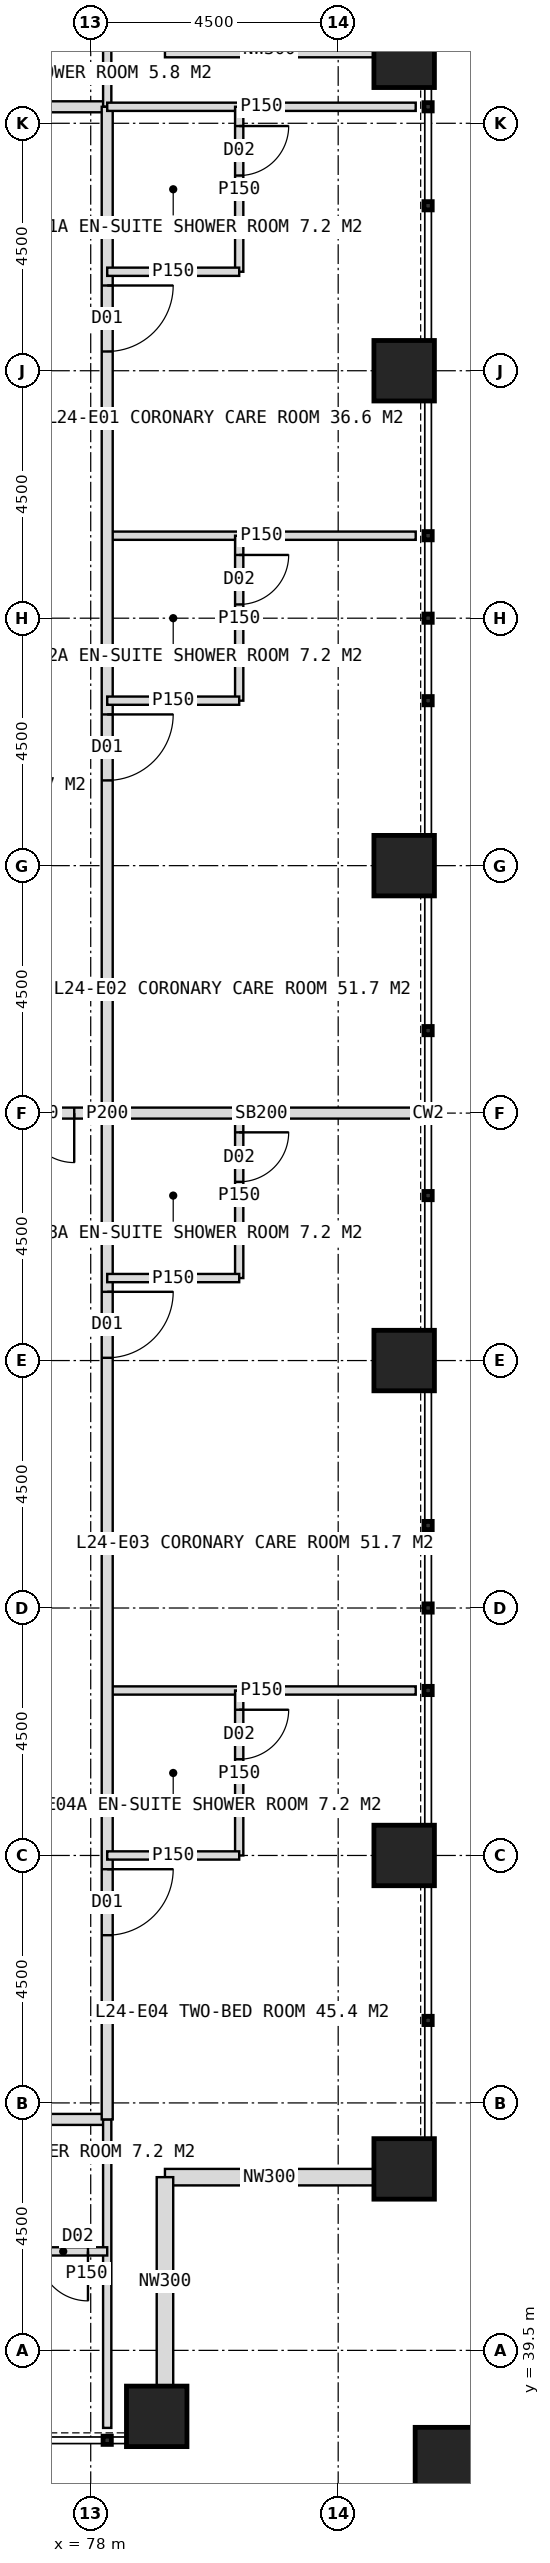
"""IFC4 building model, lengths in metres.
Left out: names, types, materials, properties, quantities, classifications, styles, units other than length and angle.
Written with IfcOpenShell. Run it as: python <this file> out.ifc"""

import sys

from ifc_helpers import new_model, si_unit, direction, frame, frame_2d, origin, origin_2d, place, context, subcontext, project, spatial, rectangle, hollow_rectangle, extrude, element, fill, save


model = new_model("IFC4")
c1 = context("Model", 3, precision=1e-05, world=origin(), true_north=direction((0.0, 1.0)))
c2 = subcontext(c1, "Body", "Model", "MODEL_VIEW")
j1 = project(units=[si_unit("LENGTHUNIT", "METRE"), si_unit("PLANEANGLEUNIT", "RADIAN")], contexts=[c1])
p1 = place(None, origin())
s1 = spatial("IfcSite", under=j1, at=p1, CompositionType="ELEMENT")
p2 = place(p1, origin())
s2 = spatial("IfcBuilding", under=s1, at=p2, CompositionType="ELEMENT")
p3 = place(p2, frame((0.0, 0.0, 104.0)))
s3 = spatial("IfcBuildingStorey", under=s2, at=p3, CompositionType="ELEMENT", Elevation=104.0)
for number, where, z_axis, x_axis in (
    (1, (83.7, 42.8, 0.0), (0.0, 0.0, 1.0), (1.0, 0.0, 0.0)),
    (2, (83.7, 48.5, 0.0), (0.0, 0.0, 1.0), (1.0, 0.0, 0.0)),
    (3, (83.7, 57.5, 0.0), (0.0, 0.0, 1.0), (1.0, 0.0, 0.0)),
    (4, (83.7, 66.5, 0.0), (0.0, 0.0, 1.0), (1.0, 0.0, 0.0)),
    (5, (83.7, 75.5, 0.0), (0.0, 0.0, 1.0), (1.0, 0.0, 0.0)),
    (6, (79.2, 38.3, 0.0), (0.0, 0.0, 1.0), (1.0, 0.0, 0.0)),
    (7, (83.7, 81.2, 0.0), (0.0, 0.0, 1.0), (1.0, 0.0, 0.0)),
):
    element("IfcColumn", number, at=place(p3, frame(where, z_axis=z_axis, x_axis=x_axis)), inside=s3, PredefinedType="COLUMN", context=c2, shape_type="SweptSolid", body=[
        extrude(hollow_rectangle(XDim=1.1, YDim=1.1, WallThickness=0.1, at=origin_2d()), origin(), (0.0, 0.0, 1.0), 4.0),
    ])
p4 = place(p3, frame((84.6, 37.4, 0.0), z_axis=(0.0, 0.0, 1.0), x_axis=(1.0, 0.0, 0.0)))
e8 = element("IfcColumn", 8, at=p4, inside=s3, PredefinedType="COLUMN", context=c2, shape_type="SweptSolid", body=[
    extrude(hollow_rectangle(XDim=1.4, YDim=1.4, WallThickness=0.08, at=origin_2d()), origin(), (0.0, 0.0, 1.0), 4.0),
])
for number, where, z_axis, x_axis in (
    (9, (79.35, 81.35, 0.0), (0.0, 0.0, 1.0), (1.0, 0.0, 0.0)),
    (10, (83.15, 42.65, 0.0), (0.0, 0.0, 1.0), (-1.0, 0.0, 0.0)),
    (11, (79.35, 42.65, 0.0), (0.0, 0.0, 1.0), (0.0, -1.0, 0.0)),
):
    element("IfcWall", number, at=place(p3, frame(where, z_axis=z_axis, x_axis=x_axis)), inside=s3, PredefinedType="ELEMENTEDWALL", context=c2, shape_type="SweptSolid", body=[
        extrude(rectangle(XDim=3.8, YDim=0.3, at=frame_2d((1.9, 0.0))), origin(), (0.0, 0.0, 1.0), 4.0),
    ])
p5 = place(p3, frame((41.7, 80.3, 0.0), z_axis=(0.0, 0.0, 1.0), x_axis=(1.0, 0.0, 0.0)))
e12 = element("IfcWall", 12, at=p5, inside=s3, PredefinedType="PARTITIONING", context=c2, shape_type="SweptSolid", body=[
    extrude(rectangle(XDim=36.6, YDim=0.2, at=frame_2d((18.3, 0.0))), origin(), (0.0, 0.0, 1.0), 3.75),
])
p6 = place(p5, frame((3.25, 0.0, 0.0)))
e13 = element("IfcOpeningElement", 13, at=p6, cuts=e12, PredefinedType="OPENING", context=c2, shape_type="SweptSolid", body=[
    extrude(rectangle(XDim=1.2, YDim=2.2, at=frame_2d((0.6, 1.1))), frame((0.0, 0.11, 0.0), z_axis=(0.0, -1.0, 0.0), x_axis=(1.0, 0.0, 0.0)), (0.0, 0.0, 1.0), 0.22),
])
p7 = place(p5, frame((11.05, 0.0, 0.0)))
e14 = element("IfcOpeningElement", 14, at=p7, cuts=e12, PredefinedType="OPENING", context=c2, shape_type="SweptSolid", body=[
    extrude(rectangle(XDim=1.2, YDim=2.2, at=frame_2d((0.6, 1.1))), frame((0.0, 0.11, 0.0), z_axis=(0.0, -1.0, 0.0), x_axis=(1.0, 0.0, 0.0)), (0.0, 0.0, 1.0), 0.22),
])
p8 = place(p5, frame((20.05, 0.0, 0.0)))
e15 = element("IfcOpeningElement", 15, at=p8, cuts=e12, PredefinedType="OPENING", context=c2, shape_type="SweptSolid", body=[
    extrude(rectangle(XDim=1.2, YDim=2.2, at=frame_2d((0.6, 1.1))), frame((0.0, 0.11, 0.0), z_axis=(0.0, -1.0, 0.0), x_axis=(1.0, 0.0, 0.0)), (0.0, 0.0, 1.0), 0.22),
])
p9 = place(p5, frame((28.45, 0.0, 0.0)))
e16 = element("IfcOpeningElement", 16, at=p9, cuts=e12, PredefinedType="OPENING", context=c2, shape_type="SweptSolid", body=[
    extrude(rectangle(XDim=1.2, YDim=2.2, at=frame_2d((0.6, 1.1))), frame((0.0, 0.11, 0.0), z_axis=(0.0, -1.0, 0.0), x_axis=(1.0, 0.0, 0.0)), (0.0, 0.0, 1.0), 0.22),
])
p10 = place(p3, frame((78.3, 80.3, 0.0), z_axis=(0.0, 0.0, 1.0), x_axis=(0.0, 1.0, 0.0)))
e17 = element("IfcWall", 17, at=p10, inside=s3, PredefinedType="PARTITIONING", context=c2, shape_type="SweptSolid", body=[
    extrude(rectangle(XDim=2.4, YDim=0.15, at=frame_2d((1.2, 0.0))), origin(), (0.0, 0.0, 1.0), 3.75),
])
p11 = place(p3, frame((78.3, 43.7, 0.0), z_axis=(0.0, 0.0, 1.0), x_axis=(-1.0, 0.0, 0.0)))
e18 = element("IfcWall", 18, at=p11, inside=s3, PredefinedType="PARTITIONING", context=c2, shape_type="SweptSolid", body=[
    extrude(rectangle(XDim=36.6, YDim=0.2, at=frame_2d((18.3, 0.0))), origin(), (0.0, 0.0, 1.0), 3.75),
])
p12 = place(p11, frame((3.25, 0.0, 0.0)))
e19 = element("IfcOpeningElement", 19, at=p12, cuts=e18, PredefinedType="OPENING", context=c2, shape_type="SweptSolid", body=[
    extrude(rectangle(XDim=1.2, YDim=2.2, at=frame_2d((0.6, 1.1))), frame((0.0, 0.11, 0.0), z_axis=(0.0, -1.0, 0.0), x_axis=(1.0, 0.0, 0.0)), (0.0, 0.0, 1.0), 0.22),
])
p13 = place(p11, frame((11.05, 0.0, 0.0)))
e20 = element("IfcOpeningElement", 20, at=p13, cuts=e18, PredefinedType="OPENING", context=c2, shape_type="SweptSolid", body=[
    extrude(rectangle(XDim=1.2, YDim=2.2, at=frame_2d((0.6, 1.1))), frame((0.0, 0.11, 0.0), z_axis=(0.0, -1.0, 0.0), x_axis=(1.0, 0.0, 0.0)), (0.0, 0.0, 1.0), 0.22),
])
p14 = place(p11, frame((20.05, 0.0, 0.0)))
e21 = element("IfcOpeningElement", 21, at=p14, cuts=e18, PredefinedType="OPENING", context=c2, shape_type="SweptSolid", body=[
    extrude(rectangle(XDim=1.2, YDim=2.2, at=frame_2d((0.6, 1.1))), frame((0.0, 0.11, 0.0), z_axis=(0.0, -1.0, 0.0), x_axis=(1.0, 0.0, 0.0)), (0.0, 0.0, 1.0), 0.22),
])
p15 = place(p11, frame((28.45, 0.0, 0.0)))
e22 = element("IfcOpeningElement", 22, at=p15, cuts=e18, PredefinedType="OPENING", context=c2, shape_type="SweptSolid", body=[
    extrude(rectangle(XDim=1.2, YDim=2.2, at=frame_2d((0.6, 1.1))), frame((0.0, 0.11, 0.0), z_axis=(0.0, -1.0, 0.0), x_axis=(1.0, 0.0, 0.0)), (0.0, 0.0, 1.0), 0.22),
])
p16 = place(p3, frame((78.3, 43.7, 0.0), z_axis=(0.0, 0.0, 1.0), x_axis=(0.0, -1.0, 0.0)))
e23 = element("IfcWall", 23, at=p16, inside=s3, PredefinedType="PARTITIONING", context=c2, shape_type="SweptSolid", body=[
    extrude(rectangle(XDim=5.61, YDim=0.15, at=frame_2d((2.805, 0.0))), origin(), (0.0, 0.0, 1.0), 3.75),
])
p17 = place(p3, frame((78.3, 41.3, 0.0), z_axis=(0.0, 0.0, 1.0), x_axis=(-1.0, 0.0, 0.0)))
e24 = element("IfcWall", 24, at=p17, inside=s3, PredefinedType="PARTITIONING", context=c2, shape_type="SweptSolid", body=[
    extrude(rectangle(XDim=3.0, YDim=0.15, at=frame_2d((1.5, 0.0))), origin(), (0.0, 0.0, 1.0), 3.75),
])
p18 = place(p17, frame((0.35, 0.0, 0.0)))
e25 = element("IfcOpeningElement", 25, at=p18, cuts=e24, PredefinedType="OPENING", context=c2, shape_type="SweptSolid", body=[
    extrude(rectangle(XDim=0.9, YDim=2.1, at=frame_2d((0.45, 1.05))), frame((0.0, 0.085, 0.0), z_axis=(0.0, -1.0, 0.0), x_axis=(1.0, 0.0, 0.0)), (0.0, 0.0, 1.0), 0.17),
])
p19 = place(p3, frame((78.3, 72.5, 0.0), z_axis=(0.0, 0.0, 1.0), x_axis=(1.0, 0.0, 0.0)))
e26 = element("IfcWall", 26, at=p19, inside=s3, PredefinedType="PARTITIONING", context=c2, shape_type="SweptSolid", body=[
    extrude(rectangle(XDim=5.61, YDim=0.15, at=frame_2d((2.805, 0.0))), origin(), (0.0, 0.0, 1.0), 3.75),
])
p20 = place(p3, frame((78.3, 62.0, 0.0), z_axis=(0.0, 0.0, 1.0), x_axis=(1.0, 0.0, 0.0)))
e27 = element("IfcWall", 27, at=p20, inside=s3, PredefinedType="SOLIDWALL", context=c2, shape_type="SweptSolid", body=[
    extrude(rectangle(XDim=5.61, YDim=0.2, at=frame_2d((2.805, 0.0))), origin(), (0.0, 0.0, 1.0), 2.95),
])
p21 = place(p3, frame((78.3, 51.5, 0.0), z_axis=(0.0, 0.0, 1.0), x_axis=(1.0, 0.0, 0.0)))
e28 = element("IfcWall", 28, at=p21, inside=s3, PredefinedType="PARTITIONING", context=c2, shape_type="SweptSolid", body=[
    extrude(rectangle(XDim=5.61, YDim=0.15, at=frame_2d((2.805, 0.0))), origin(), (0.0, 0.0, 1.0), 3.75),
])
p22 = place(p3, frame((78.3, 80.3, 0.0), z_axis=(0.0, 0.0, 1.0), x_axis=(0.0, -1.0, 0.0)))
e29 = element("IfcWall", 29, at=p22, inside=s3, PredefinedType="PARTITIONING", context=c2, shape_type="SweptSolid", body=[
    extrude(rectangle(XDim=36.6, YDim=0.2, at=frame_2d((18.3, 0.0))), origin(), (0.0, 0.0, 1.0), 3.75),
])
p23 = place(p22, frame((3.25, 0.0, 0.0)))
e30 = element("IfcOpeningElement", 30, at=p23, cuts=e29, PredefinedType="OPENING", context=c2, shape_type="SweptSolid", body=[
    extrude(rectangle(XDim=1.2, YDim=2.2, at=frame_2d((0.6, 1.1))), frame((0.0, 0.11, 0.0), z_axis=(0.0, -1.0, 0.0), x_axis=(1.0, 0.0, 0.0)), (0.0, 0.0, 1.0), 0.22),
])
p24 = place(p22, frame((11.05, 0.0, 0.0)))
e31 = element("IfcOpeningElement", 31, at=p24, cuts=e29, PredefinedType="OPENING", context=c2, shape_type="SweptSolid", body=[
    extrude(rectangle(XDim=1.2, YDim=2.2, at=frame_2d((0.6, 1.1))), frame((0.0, 0.11, 0.0), z_axis=(0.0, -1.0, 0.0), x_axis=(1.0, 0.0, 0.0)), (0.0, 0.0, 1.0), 0.22),
])
p25 = place(p22, frame((21.55, 0.0, 0.0)))
e32 = element("IfcOpeningElement", 32, at=p25, cuts=e29, PredefinedType="OPENING", context=c2, shape_type="SweptSolid", body=[
    extrude(rectangle(XDim=1.2, YDim=2.2, at=frame_2d((0.6, 1.1))), frame((0.0, 0.11, 0.0), z_axis=(0.0, -1.0, 0.0), x_axis=(1.0, 0.0, 0.0)), (0.0, 0.0, 1.0), 0.22),
])
p26 = place(p22, frame((32.05, 0.0, 0.0)))
e33 = element("IfcOpeningElement", 33, at=p26, cuts=e29, PredefinedType="OPENING", context=c2, shape_type="SweptSolid", body=[
    extrude(rectangle(XDim=1.2, YDim=2.2, at=frame_2d((0.6, 1.1))), frame((0.0, 0.11, 0.0), z_axis=(0.0, -1.0, 0.0), x_axis=(1.0, 0.0, 0.0)), (0.0, 0.0, 1.0), 0.22),
])
p27 = place(p3, frame((78.3, 80.3, 0.0), z_axis=(0.0, 0.0, 1.0), x_axis=(1.0, 0.0, 0.0)))
e34 = element("IfcWall", 34, at=p27, inside=s3, PredefinedType="PARTITIONING", context=c2, shape_type="SweptSolid", body=[
    extrude(rectangle(XDim=5.61, YDim=0.15, at=frame_2d((2.805, 0.0))), origin(), (0.0, 0.0, 1.0), 3.75),
])
p28 = place(p3, frame((80.7, 80.3, 0.0), z_axis=(0.0, 0.0, 1.0), x_axis=(0.0, -1.0, 0.0)))
e35 = element("IfcWall", 35, at=p28, inside=s3, PredefinedType="PARTITIONING", context=c2, shape_type="SweptSolid", body=[
    extrude(rectangle(XDim=3.0, YDim=0.15, at=frame_2d((1.5, 0.0))), origin(), (0.0, 0.0, 1.0), 3.75),
])
p29 = place(p28, frame((0.35, 0.0, 0.0)))
e36 = element("IfcOpeningElement", 36, at=p29, cuts=e35, PredefinedType="OPENING", context=c2, shape_type="SweptSolid", body=[
    extrude(rectangle(XDim=0.9, YDim=2.1, at=frame_2d((0.45, 1.05))), frame((0.0, 0.085, 0.0), z_axis=(0.0, -1.0, 0.0), x_axis=(1.0, 0.0, 0.0)), (0.0, 0.0, 1.0), 0.17),
])
p30 = place(p3, frame((78.3, 77.3, 0.0), z_axis=(0.0, 0.0, 1.0), x_axis=(1.0, 0.0, 0.0)))
e37 = element("IfcWall", 37, at=p30, inside=s3, PredefinedType="PARTITIONING", context=c2, shape_type="SweptSolid", body=[
    extrude(rectangle(XDim=2.4, YDim=0.15, at=frame_2d((1.2, 0.0))), origin(), (0.0, 0.0, 1.0), 3.75),
])
p31 = place(p3, frame((80.7, 72.5, 0.0), z_axis=(0.0, 0.0, 1.0), x_axis=(0.0, -1.0, 0.0)))
e38 = element("IfcWall", 38, at=p31, inside=s3, PredefinedType="PARTITIONING", context=c2, shape_type="SweptSolid", body=[
    extrude(rectangle(XDim=3.0, YDim=0.15, at=frame_2d((1.5, 0.0))), origin(), (0.0, 0.0, 1.0), 3.75),
])
p32 = place(p31, frame((0.35, 0.0, 0.0)))
e39 = element("IfcOpeningElement", 39, at=p32, cuts=e38, PredefinedType="OPENING", context=c2, shape_type="SweptSolid", body=[
    extrude(rectangle(XDim=0.9, YDim=2.1, at=frame_2d((0.45, 1.05))), frame((0.0, 0.085, 0.0), z_axis=(0.0, -1.0, 0.0), x_axis=(1.0, 0.0, 0.0)), (0.0, 0.0, 1.0), 0.17),
])
p33 = place(p3, frame((78.3, 69.5, 0.0), z_axis=(0.0, 0.0, 1.0), x_axis=(1.0, 0.0, 0.0)))
e40 = element("IfcWall", 40, at=p33, inside=s3, PredefinedType="PARTITIONING", context=c2, shape_type="SweptSolid", body=[
    extrude(rectangle(XDim=2.4, YDim=0.15, at=frame_2d((1.2, 0.0))), origin(), (0.0, 0.0, 1.0), 3.75),
])
p34 = place(p3, frame((80.7, 62.0, 0.0), z_axis=(0.0, 0.0, 1.0), x_axis=(0.0, -1.0, 0.0)))
e41 = element("IfcWall", 41, at=p34, inside=s3, PredefinedType="PARTITIONING", context=c2, shape_type="SweptSolid", body=[
    extrude(rectangle(XDim=3.0, YDim=0.15, at=frame_2d((1.5, 0.0))), origin(), (0.0, 0.0, 1.0), 3.75),
])
p35 = place(p34, frame((0.35, 0.0, 0.0)))
e42 = element("IfcOpeningElement", 42, at=p35, cuts=e41, PredefinedType="OPENING", context=c2, shape_type="SweptSolid", body=[
    extrude(rectangle(XDim=0.9, YDim=2.1, at=frame_2d((0.45, 1.05))), frame((0.0, 0.085, 0.0), z_axis=(0.0, -1.0, 0.0), x_axis=(1.0, 0.0, 0.0)), (0.0, 0.0, 1.0), 0.17),
])
p36 = place(p3, frame((78.3, 59.0, 0.0), z_axis=(0.0, 0.0, 1.0), x_axis=(1.0, 0.0, 0.0)))
e43 = element("IfcWall", 43, at=p36, inside=s3, PredefinedType="PARTITIONING", context=c2, shape_type="SweptSolid", body=[
    extrude(rectangle(XDim=2.4, YDim=0.15, at=frame_2d((1.2, 0.0))), origin(), (0.0, 0.0, 1.0), 3.75),
])
p37 = place(p3, frame((80.7, 51.5, 0.0), z_axis=(0.0, 0.0, 1.0), x_axis=(0.0, -1.0, 0.0)))
e44 = element("IfcWall", 44, at=p37, inside=s3, PredefinedType="PARTITIONING", context=c2, shape_type="SweptSolid", body=[
    extrude(rectangle(XDim=3.0, YDim=0.15, at=frame_2d((1.5, 0.0))), origin(), (0.0, 0.0, 1.0), 3.75),
])
p38 = place(p37, frame((0.35, 0.0, 0.0)))
e45 = element("IfcOpeningElement", 45, at=p38, cuts=e44, PredefinedType="OPENING", context=c2, shape_type="SweptSolid", body=[
    extrude(rectangle(XDim=0.9, YDim=2.1, at=frame_2d((0.45, 1.05))), frame((0.0, 0.085, 0.0), z_axis=(0.0, -1.0, 0.0), x_axis=(1.0, 0.0, 0.0)), (0.0, 0.0, 1.0), 0.17),
])
p39 = place(p3, frame((78.3, 48.5, 0.0), z_axis=(0.0, 0.0, 1.0), x_axis=(1.0, 0.0, 0.0)))
e46 = element("IfcWall", 46, at=p39, inside=s3, PredefinedType="PARTITIONING", context=c2, shape_type="SweptSolid", body=[
    extrude(rectangle(XDim=2.4, YDim=0.15, at=frame_2d((1.2, 0.0))), origin(), (0.0, 0.0, 1.0), 2.95),
])
p40 = place(p3, frame((75.6, 62.0, 0.0), z_axis=(0.0, 0.0, 1.0), x_axis=(1.0, 0.0, 0.0)))
e47 = element("IfcWall", 47, at=p40, inside=s3, PredefinedType="SOLIDWALL", context=c2, shape_type="SweptSolid", body=[
    extrude(rectangle(XDim=2.7, YDim=0.2, at=frame_2d((1.35, 0.0))), origin(), (0.0, 0.0, 1.0), 2.95),
])
p41 = place(p40, frame((0.3, 0.0, 0.0)))
e48 = element("IfcOpeningElement", 48, at=p41, cuts=e47, PredefinedType="OPENING", context=c2, shape_type="SweptSolid", body=[
    extrude(rectangle(XDim=1.8, YDim=2.2, at=frame_2d((0.9, 1.1))), frame((0.0, 0.11, 0.0), z_axis=(0.0, -1.0, 0.0), x_axis=(1.0, 0.0, 0.0)), (0.0, 0.0, 1.0), 0.22),
])
p42 = place(p18, origin())
e49 = element("IfcDoor", 49, at=p42, inside=s3, OperationType="SINGLE_SWING_LEFT", PredefinedType="DOOR", context=c2, shape_type="SweptSolid", body=[
    extrude(rectangle(XDim=0.9, YDim=2.1, at=frame_2d((0.45, 1.05))), frame((0.0, 0.025, 0.0), z_axis=(0.0, -1.0, 0.0), x_axis=(1.0, 0.0, 0.0)), (0.0, 0.0, 1.0), 0.05),
])
fill(e25, e49)
p43 = place(p23, origin())
e50 = element("IfcDoor", 50, at=p43, inside=s3, OperationType="SINGLE_SWING_LEFT", PredefinedType="DOOR", context=c2, shape_type="SweptSolid", body=[
    extrude(rectangle(XDim=1.2, YDim=2.2, at=frame_2d((0.6, 1.1))), frame((0.0, 0.025, 0.0), z_axis=(0.0, -1.0, 0.0), x_axis=(1.0, 0.0, 0.0)), (0.0, 0.0, 1.0), 0.05),
])
fill(e30, e50)
p44 = place(p29, origin())
e51 = element("IfcDoor", 51, at=p44, inside=s3, OperationType="SINGLE_SWING_LEFT", PredefinedType="DOOR", context=c2, shape_type="SweptSolid", body=[
    extrude(rectangle(XDim=0.9, YDim=2.1, at=frame_2d((0.45, 1.05))), frame((0.0, 0.025, 0.0), z_axis=(0.0, -1.0, 0.0), x_axis=(1.0, 0.0, 0.0)), (0.0, 0.0, 1.0), 0.05),
])
fill(e36, e51)
p45 = place(p24, origin())
e52 = element("IfcDoor", 52, at=p45, inside=s3, OperationType="SINGLE_SWING_LEFT", PredefinedType="DOOR", context=c2, shape_type="SweptSolid", body=[
    extrude(rectangle(XDim=1.2, YDim=2.2, at=frame_2d((0.6, 1.1))), frame((0.0, 0.025, 0.0), z_axis=(0.0, -1.0, 0.0), x_axis=(1.0, 0.0, 0.0)), (0.0, 0.0, 1.0), 0.05),
])
fill(e31, e52)
p46 = place(p32, origin())
e53 = element("IfcDoor", 53, at=p46, inside=s3, OperationType="SINGLE_SWING_LEFT", PredefinedType="DOOR", context=c2, shape_type="SweptSolid", body=[
    extrude(rectangle(XDim=0.9, YDim=2.1, at=frame_2d((0.45, 1.05))), frame((0.0, 0.025, 0.0), z_axis=(0.0, -1.0, 0.0), x_axis=(1.0, 0.0, 0.0)), (0.0, 0.0, 1.0), 0.05),
])
fill(e39, e53)
p47 = place(p25, origin())
e54 = element("IfcDoor", 54, at=p47, inside=s3, OperationType="SINGLE_SWING_LEFT", PredefinedType="DOOR", context=c2, shape_type="SweptSolid", body=[
    extrude(rectangle(XDim=1.2, YDim=2.2, at=frame_2d((0.6, 1.1))), frame((0.0, 0.025, 0.0), z_axis=(0.0, -1.0, 0.0), x_axis=(1.0, 0.0, 0.0)), (0.0, 0.0, 1.0), 0.05),
])
fill(e32, e54)
p48 = place(p35, origin())
e55 = element("IfcDoor", 55, at=p48, inside=s3, OperationType="SINGLE_SWING_LEFT", PredefinedType="DOOR", context=c2, shape_type="SweptSolid", body=[
    extrude(rectangle(XDim=0.9, YDim=2.1, at=frame_2d((0.45, 1.05))), frame((0.0, 0.025, 0.0), z_axis=(0.0, -1.0, 0.0), x_axis=(1.0, 0.0, 0.0)), (0.0, 0.0, 1.0), 0.05),
])
fill(e42, e55)
p49 = place(p26, origin())
e56 = element("IfcDoor", 56, at=p49, inside=s3, OperationType="SINGLE_SWING_LEFT", PredefinedType="DOOR", context=c2, shape_type="SweptSolid", body=[
    extrude(rectangle(XDim=1.2, YDim=2.2, at=frame_2d((0.6, 1.1))), frame((0.0, 0.025, 0.0), z_axis=(0.0, -1.0, 0.0), x_axis=(1.0, 0.0, 0.0)), (0.0, 0.0, 1.0), 0.05),
])
fill(e33, e56)
p50 = place(p38, origin())
e57 = element("IfcDoor", 57, at=p50, inside=s3, OperationType="SINGLE_SWING_LEFT", PredefinedType="DOOR", context=c2, shape_type="SweptSolid", body=[
    extrude(rectangle(XDim=0.9, YDim=2.1, at=frame_2d((0.45, 1.05))), frame((0.0, 0.025, 0.0), z_axis=(0.0, -1.0, 0.0), x_axis=(1.0, 0.0, 0.0)), (0.0, 0.0, 1.0), 0.05),
])
fill(e45, e57)
p51 = place(p41, origin())
e58 = element("IfcDoor", 58, at=p51, inside=s3, OperationType="DOUBLE_DOOR_DOUBLE_SWING", PredefinedType="DOOR", context=c2, shape_type="SweptSolid", body=[
    extrude(rectangle(XDim=1.8, YDim=2.2, at=frame_2d((0.9, 1.1))), frame((0.0, 0.025, 0.0), z_axis=(0.0, -1.0, 0.0), x_axis=(1.0, 0.0, 0.0)), (0.0, 0.0, 1.0), 0.05),
])
fill(e48, e58)
save(model, sys.argv[1])
